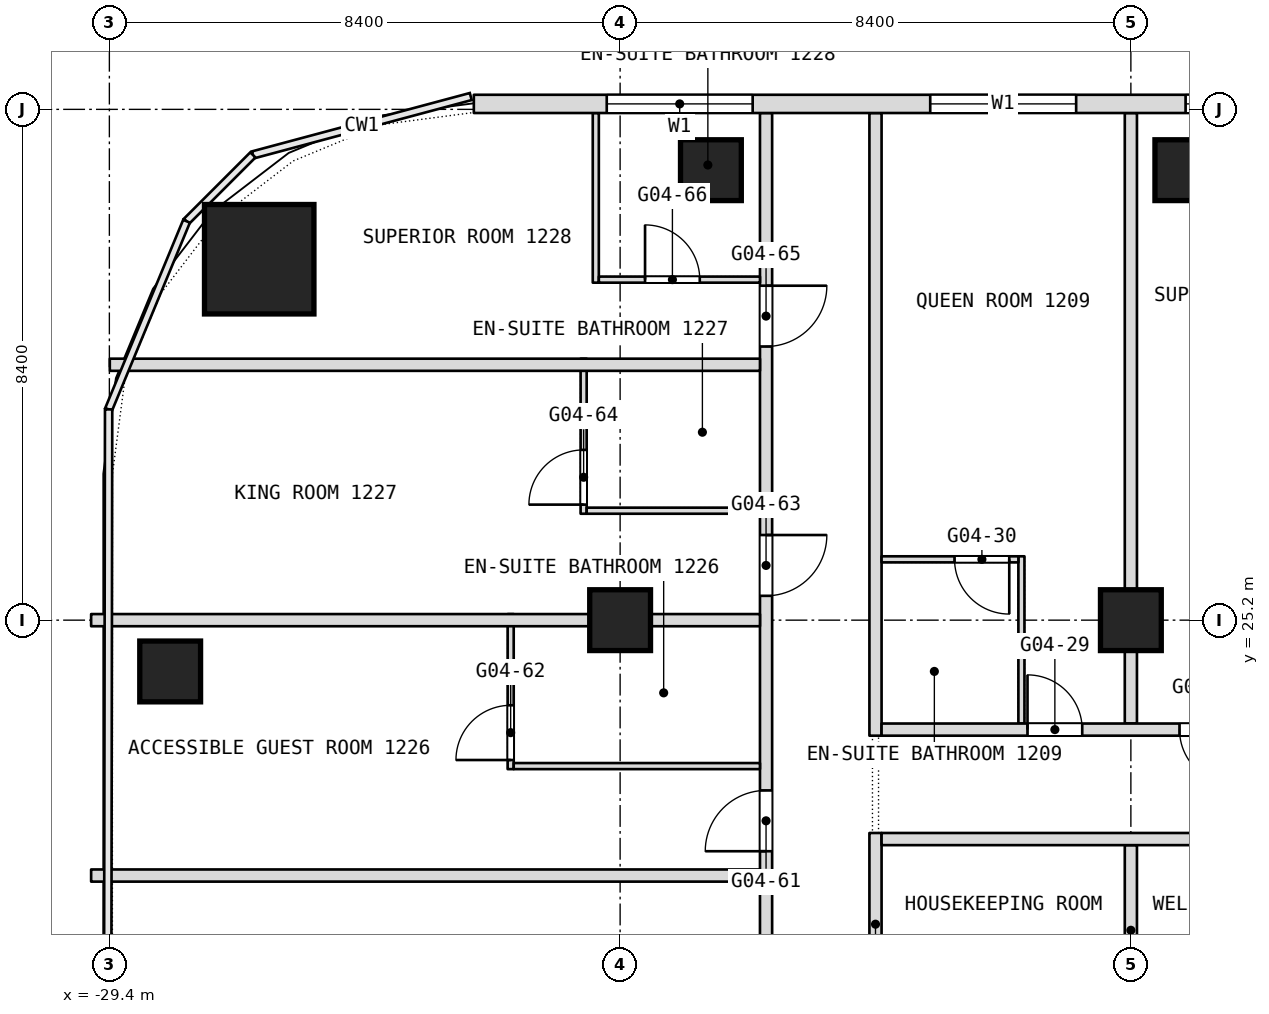
"""IFC4 building model, lengths in metres.
Left out: names, types, materials, properties, quantities, classifications, styles, units other than length and angle.
Written with IfcOpenShell. Run it as: python <this file> out.ifc"""

import sys

from ifc_helpers import new_model, si_unit, direction, frame, frame_2d, origin, origin_2d, place, context, subcontext, project, spatial, rectangle, extrude, element, fill, save


model = new_model("IFC4")
c1 = context("Model", 3, precision=1e-05, world=origin(), true_north=direction((0.0, 1.0)))
c2 = subcontext(c1, "Body", "Model", "MODEL_VIEW")
j1 = project(units=[si_unit("LENGTHUNIT", "METRE"), si_unit("PLANEANGLEUNIT", "RADIAN")], contexts=[c1])
p1 = place(None, origin())
s1 = spatial("IfcSite", under=j1, at=p1, CompositionType="ELEMENT")
p2 = place(p1, origin())
s2 = spatial("IfcBuilding", under=s1, at=p2, CompositionType="ELEMENT")
p3 = place(p2, frame((0.0, 0.0, 58.1)))
s3 = spatial("IfcBuildingStorey", under=s2, at=p3, CompositionType="ELEMENT", Elevation=58.1)
p4 = place(p3, frame((-26.936, 31.135, 0.0), z_axis=(0.0, 0.0, 1.0), x_axis=(1.0, 0.0, 0.0)))
e1 = element("IfcColumn", 1, at=p4, inside=s3, PredefinedType="COLUMN", context=c2, shape_type="SweptSolid", body=[
    extrude(rectangle(XDim=1.8, YDim=1.8, at=origin_2d()), origin(), (0.0, 0.0, 1.0), 3.6),
])
for number, where, z_axis, x_axis in (
    (2, (-21.0, 25.2, 0.0), (0.0, 0.0, 1.0), (1.0, 0.0, 0.0)),
    (3, (-12.6, 25.2, 0.0), (0.0, 0.0, 1.0), (1.0, 0.0, 0.0)),
    (4, (-28.4, 24.356, 0.0), (0.0, 0.0, 1.0), (1.0, 0.0, 0.0)),
    (5, (-19.507, 32.6, 0.0), (0.0, 0.0, 1.0), (1.0, 0.0, 0.0)),
    (6, (-11.704, 32.6, 0.0), (0.0, 0.0, 1.0), (1.0, 0.0, 0.0)),
):
    element("IfcColumn", number, at=place(p3, frame(where, z_axis=z_axis, x_axis=x_axis)), inside=s3, PredefinedType="COLUMN", context=c2, shape_type="SweptSolid", body=[
        extrude(rectangle(XDim=1.0, YDim=1.0, at=origin_2d()), origin(), (0.0, 0.0, 1.0), 3.6),
    ])
p5 = place(p3, frame((-12.6, 18.7, 0.0), z_axis=(0.0, 0.0, 1.0), x_axis=(0.0, 1.0, 0.0)))
e7 = element("IfcWall", 7, at=p5, inside=s3, PredefinedType="PARTITIONING", context=c2, shape_type="SweptSolid", body=[
    extrude(rectangle(XDim=2.8, YDim=0.2, at=frame_2d((1.4, 0.0))), origin(), (0.0, 0.0, 1.0), 3.34),
])
p6 = place(p3, frame((-12.6, 23.5, 0.0), z_axis=(0.0, 0.0, 1.0), x_axis=(0.0, 1.0, 0.0)))
e8 = element("IfcWall", 8, at=p6, inside=s3, PredefinedType="PARTITIONING", context=c2, shape_type="SweptSolid", body=[
    extrude(rectangle(XDim=10.04, YDim=0.2, at=frame_2d((5.02, 0.0))), origin(), (0.0, 0.0, 1.0), 3.34),
])
p7 = place(p3, frame((-14.4, 23.5, 0.0), z_axis=(0.0, 0.0, 1.0), x_axis=(0.0, 1.0, 0.0)))
e9 = element("IfcWall", 9, at=p7, inside=s3, PredefinedType="PARTITIONING", context=c2, shape_type="SweptSolid", body=[
    extrude(rectangle(XDim=2.75, YDim=0.1, at=frame_2d((1.375, 0.0))), origin(), (0.0, 0.0, 1.0), 3.34),
])
p8 = place(p3, frame((-16.8, 18.7, 0.0), z_axis=(0.0, 0.0, 1.0), x_axis=(0.0, 1.0, 0.0)))
e10 = element("IfcWall", 10, at=p8, inside=s3, PredefinedType="PARTITIONING", context=c2, shape_type="SweptSolid", body=[
    extrude(rectangle(XDim=3.0, YDim=0.2, at=frame_2d((1.5, 0.0))), origin(), (0.0, 0.0, 1.0), 3.34),
])
p9 = place(p3, frame((-16.8, 23.3, 0.0), z_axis=(0.0, 0.0, 1.0), x_axis=(0.0, 1.0, 0.0)))
e11 = element("IfcWall", 11, at=p9, inside=s3, PredefinedType="PARTITIONING", context=c2, shape_type="SweptSolid", body=[
    extrude(rectangle(XDim=10.24, YDim=0.2, at=frame_2d((5.12, 0.0))), origin(), (0.0, 0.0, 1.0), 3.34),
])
p10 = place(p3, frame((-18.6, 18.5, 0.0), z_axis=(0.0, 0.0, 1.0), x_axis=(0.0, 1.0, 0.0)))
e12 = element("IfcWall", 12, at=p10, inside=s3, PredefinedType="PARTITIONING", context=c2, shape_type="SweptSolid", body=[
    extrude(rectangle(XDim=15.04, YDim=0.2, at=frame_2d((7.52, 0.0))), origin(), (0.0, 0.0, 1.0), 3.34),
])
p11 = place(p10, frame((2.9, 0.0, 0.0)))
e13 = element("IfcOpeningElement", 13, at=p11, cuts=e12, PredefinedType="OPENING", context=c2, shape_type="SweptSolid", body=[
    extrude(rectangle(XDim=1.0, YDim=2.1, at=frame_2d((0.5, 1.05))), frame((0.0, 0.1, 0.0), z_axis=(0.0, -1.0, 0.0), x_axis=(1.0, 0.0, 0.0)), (0.0, 0.0, 1.0), 0.2),
])
p12 = place(p10, frame((7.1, 0.0, 0.0)))
e14 = element("IfcOpeningElement", 14, at=p12, cuts=e12, PredefinedType="OPENING", context=c2, shape_type="SweptSolid", body=[
    extrude(rectangle(XDim=1.0, YDim=2.1, at=frame_2d((0.5, 1.05))), frame((0.0, 0.1, 0.0), z_axis=(0.0, -1.0, 0.0), x_axis=(1.0, 0.0, 0.0)), (0.0, 0.0, 1.0), 0.2),
])
p13 = place(p10, frame((11.2, 0.0, 0.0)))
e15 = element("IfcOpeningElement", 15, at=p13, cuts=e12, PredefinedType="OPENING", context=c2, shape_type="SweptSolid", body=[
    extrude(rectangle(XDim=1.0, YDim=2.1, at=frame_2d((0.5, 1.05))), frame((0.0, 0.1, 0.0), z_axis=(0.0, -1.0, 0.0), x_axis=(1.0, 0.0, 0.0)), (0.0, 0.0, 1.0), 0.2),
])
p14 = place(p3, frame((-29.7, 21.0, 0.0), z_axis=(0.0, 0.0, 1.0), x_axis=(1.0, 0.0, 0.0)))
e16 = element("IfcWall", 16, at=p14, inside=s3, PredefinedType="PARTITIONING", context=c2, shape_type="SweptSolid", body=[
    extrude(rectangle(XDim=11.0, YDim=0.2, at=frame_2d((5.5, 0.0))), origin(), (0.0, 0.0, 1.0), 3.34),
])
p15 = place(p3, frame((-21.4, 30.75, 0.0), z_axis=(0.0, 0.0, 1.0), x_axis=(0.0, 1.0, 0.0)))
e17 = element("IfcWall", 17, at=p15, inside=s3, PredefinedType="PARTITIONING", context=c2, shape_type="SweptSolid", body=[
    extrude(rectangle(XDim=2.79, YDim=0.1, at=frame_2d((1.395, 0.0))), origin(), (0.0, 0.0, 1.0), 3.34),
])
p16 = place(p3, frame((-21.6, 26.95, 0.0), z_axis=(0.0, 0.0, 1.0), x_axis=(0.0, 1.0, 0.0)))
e18 = element("IfcWall", 18, at=p16, inside=s3, PredefinedType="PARTITIONING", context=c2, shape_type="SweptSolid", body=[
    extrude(rectangle(XDim=2.55, YDim=0.1, at=frame_2d((1.275, 0.0))), origin(), (0.0, 0.0, 1.0), 3.34),
])
p17 = place(p16, frame((0.15, 0.0, 0.0)))
e19 = element("IfcOpeningElement", 19, at=p17, cuts=e18, PredefinedType="OPENING", context=c2, shape_type="SweptSolid", body=[
    extrude(rectangle(XDim=0.9, YDim=2.1, at=frame_2d((0.45, 1.05))), frame((0.0, 0.05, 0.0), z_axis=(0.0, -1.0, 0.0), x_axis=(1.0, 0.0, 0.0)), (0.0, 0.0, 1.0), 0.1),
])
p18 = place(p3, frame((-16.7, 21.6, 0.0), z_axis=(0.0, 0.0, 1.0), x_axis=(1.0, 0.0, 0.0)))
e20 = element("IfcWall", 20, at=p18, inside=s3, PredefinedType="PARTITIONING", context=c2, shape_type="SweptSolid", body=[
    extrude(rectangle(XDim=24.9, YDim=0.2, at=frame_2d((12.45, 0.0))), origin(), (0.0, 0.0, 1.0), 3.34),
])
p19 = place(p3, frame((-22.8, 22.75, 0.0), z_axis=(0.0, 0.0, 1.0), x_axis=(0.0, 1.0, 0.0)))
e21 = element("IfcWall", 21, at=p19, inside=s3, PredefinedType="PARTITIONING", context=c2, shape_type="SweptSolid", body=[
    extrude(rectangle(XDim=2.55, YDim=0.1, at=frame_2d((1.275, 0.0))), origin(), (0.0, 0.0, 1.0), 3.34),
])
p20 = place(p19, frame((0.15, 0.0, 0.0)))
e22 = element("IfcOpeningElement", 22, at=p20, cuts=e21, PredefinedType="OPENING", context=c2, shape_type="SweptSolid", body=[
    extrude(rectangle(XDim=0.9, YDim=2.1, at=frame_2d((0.45, 1.05))), frame((0.0, 0.05, 0.0), z_axis=(0.0, -1.0, 0.0), x_axis=(1.0, 0.0, 0.0)), (0.0, 0.0, 1.0), 0.1),
])
p21 = place(p3, frame((-22.75, 22.8, 0.0), z_axis=(0.0, 0.0, 1.0), x_axis=(1.0, 0.0, 0.0)))
e23 = element("IfcWall", 23, at=p21, inside=s3, PredefinedType="PARTITIONING", context=c2, shape_type="SweptSolid", body=[
    extrude(rectangle(XDim=4.05, YDim=0.1, at=frame_2d((2.025, 0.0))), origin(), (0.0, 0.0, 1.0), 3.34),
])
p22 = place(p3, frame((-16.7, 23.4, 0.0), z_axis=(0.0, 0.0, 1.0), x_axis=(1.0, 0.0, 0.0)))
e24 = element("IfcWall", 24, at=p22, inside=s3, PredefinedType="PARTITIONING", context=c2, shape_type="SweptSolid", body=[
    extrude(rectangle(XDim=23.4, YDim=0.2, at=frame_2d((11.7, 0.0))), origin(), (0.0, 0.0, 1.0), 3.34),
])
p23 = place(p22, frame((2.4, 0.0, 0.0)))
e25 = element("IfcOpeningElement", 25, at=p23, cuts=e24, PredefinedType="OPENING", context=c2, shape_type="SweptSolid", body=[
    extrude(rectangle(XDim=0.9, YDim=2.1, at=frame_2d((0.45, 1.05))), frame((0.0, 0.1, 0.0), z_axis=(0.0, -1.0, 0.0), x_axis=(1.0, 0.0, 0.0)), (0.0, 0.0, 1.0), 0.2),
])
p24 = place(p22, frame((4.9, 0.0, 0.0)))
e26 = element("IfcOpeningElement", 26, at=p24, cuts=e24, PredefinedType="OPENING", context=c2, shape_type="SweptSolid", body=[
    extrude(rectangle(XDim=0.9, YDim=2.1, at=frame_2d((0.45, 1.05))), frame((0.0, 0.1, 0.0), z_axis=(0.0, -1.0, 0.0), x_axis=(1.0, 0.0, 0.0)), (0.0, 0.0, 1.0), 0.2),
])
p25 = place(p22, frame((10.8, 0.0, 0.0)))
e27 = element("IfcOpeningElement", 27, at=p25, cuts=e24, PredefinedType="OPENING", context=c2, shape_type="SweptSolid", body=[
    extrude(rectangle(XDim=0.9, YDim=2.1, at=frame_2d((0.45, 1.05))), frame((0.0, 0.1, 0.0), z_axis=(0.0, -1.0, 0.0), x_axis=(1.0, 0.0, 0.0)), (0.0, 0.0, 1.0), 0.2),
])
p26 = place(p22, frame((16.2, 0.0, 0.0)))
e28 = element("IfcOpeningElement", 28, at=p26, cuts=e24, PredefinedType="OPENING", context=c2, shape_type="SweptSolid", body=[
    extrude(rectangle(XDim=1.1, YDim=2.1, at=frame_2d((0.55, 1.05))), frame((0.0, 0.1, 0.0), z_axis=(0.0, -1.0, 0.0), x_axis=(1.0, 0.0, 0.0)), (0.0, 0.0, 1.0), 0.2),
])
p27 = place(p22, frame((21.7, 0.0, 0.0)))
e29 = element("IfcOpeningElement", 29, at=p27, cuts=e24, PredefinedType="OPENING", context=c2, shape_type="SweptSolid", body=[
    extrude(rectangle(XDim=0.9, YDim=2.1, at=frame_2d((0.45, 1.05))), frame((0.0, 0.1, 0.0), z_axis=(0.0, -1.0, 0.0), x_axis=(1.0, 0.0, 0.0)), (0.0, 0.0, 1.0), 0.2),
])
p28 = place(p3, frame((-29.7, 25.2, 0.0), z_axis=(0.0, 0.0, 1.0), x_axis=(1.0, 0.0, 0.0)))
e30 = element("IfcWall", 30, at=p28, inside=s3, PredefinedType="PARTITIONING", context=c2, shape_type="SweptSolid", body=[
    extrude(rectangle(XDim=11.0, YDim=0.2, at=frame_2d((5.5, 0.0))), origin(), (0.0, 0.0, 1.0), 2.84),
])
p29 = place(p3, frame((-16.7, 26.2, 0.0), z_axis=(0.0, 0.0, 1.0), x_axis=(1.0, 0.0, 0.0)))
e31 = element("IfcWall", 31, at=p29, inside=s3, PredefinedType="PARTITIONING", context=c2, shape_type="SweptSolid", body=[
    extrude(rectangle(XDim=2.25, YDim=0.1, at=frame_2d((1.125, 0.0))), origin(), (0.0, 0.0, 1.0), 3.34),
])
p30 = place(p29, frame((1.2, 0.0, 0.0)))
e32 = element("IfcOpeningElement", 32, at=p30, cuts=e31, PredefinedType="OPENING", context=c2, shape_type="SweptSolid", body=[
    extrude(rectangle(XDim=0.9, YDim=2.1, at=frame_2d((0.45, 1.05))), frame((0.0, 0.05, 0.0), z_axis=(0.0, -1.0, 0.0), x_axis=(1.0, 0.0, 0.0)), (0.0, 0.0, 1.0), 0.1),
])
p31 = place(p3, frame((-21.55, 27.0, 0.0), z_axis=(0.0, 0.0, 1.0), x_axis=(1.0, 0.0, 0.0)))
e33 = element("IfcWall", 33, at=p31, inside=s3, PredefinedType="PARTITIONING", context=c2, shape_type="SweptSolid", body=[
    extrude(rectangle(XDim=2.85, YDim=0.1, at=frame_2d((1.425, 0.0))), origin(), (0.0, 0.0, 1.0), 3.34),
])
p32 = place(p3, frame((-29.393, 29.4, 0.0), z_axis=(0.0, 0.0, 1.0), x_axis=(1.0, 0.0, 0.0)))
e34 = element("IfcWall", 34, at=p32, inside=s3, PredefinedType="PARTITIONING", context=c2, shape_type="SweptSolid", body=[
    extrude(rectangle(XDim=10.693, YDim=0.2, at=frame_2d((5.347, 0.0))), origin(), (0.0, 0.0, 1.0), 3.34),
])
p33 = place(p3, frame((-21.35, 30.8, 0.0), z_axis=(0.0, 0.0, 1.0), x_axis=(1.0, 0.0, 0.0)))
e35 = element("IfcWall", 35, at=p33, inside=s3, PredefinedType="PARTITIONING", context=c2, shape_type="SweptSolid", body=[
    extrude(rectangle(XDim=2.65, YDim=0.1, at=frame_2d((1.325, 0.0))), origin(), (0.0, 0.0, 1.0), 3.34),
])
p34 = place(p33, frame((0.76, 0.0, 0.0)))
e36 = element("IfcOpeningElement", 36, at=p34, cuts=e35, PredefinedType="OPENING", context=c2, shape_type="SweptSolid", body=[
    extrude(rectangle(XDim=0.9, YDim=2.1, at=frame_2d((0.45, 1.05))), frame((0.0, 0.05, 0.0), z_axis=(0.0, -1.0, 0.0), x_axis=(1.0, 0.0, 0.0)), (0.0, 0.0, 1.0), 0.1),
])
p35 = place(p3, frame((23.406, 33.69, 0.0), z_axis=(0.0, 0.0, 1.0), x_axis=(-1.0, 0.0, 0.0)))
e37 = element("IfcWall", 37, at=p35, inside=s3, PredefinedType="NOTDEFINED", context=c2, shape_type="SweptSolid", body=[
    extrude(rectangle(XDim=46.812, YDim=0.3, at=frame_2d((23.406, 0.0))), origin(), (0.0, 0.0, 1.0), 3.6),
])
p36 = place(p35, frame((2.186, 0.0, 0.9)))
e38 = element("IfcOpeningElement", 38, at=p36, cuts=e37, PredefinedType="OPENING", context=c2, shape_type="SweptSolid", body=[
    extrude(rectangle(XDim=2.4, YDim=2.1, at=frame_2d((1.2, 1.05))), frame((0.0, 0.15, 0.0), z_axis=(0.0, -1.0, 0.0), x_axis=(1.0, 0.0, 0.0)), (0.0, 0.0, 1.0), 0.3),
])
p37 = place(p35, frame((7.506, 0.0, 0.9)))
e39 = element("IfcOpeningElement", 39, at=p37, cuts=e37, PredefinedType="OPENING", context=c2, shape_type="SweptSolid", body=[
    extrude(rectangle(XDim=2.4, YDim=2.1, at=frame_2d((1.2, 1.05))), frame((0.0, 0.15, 0.0), z_axis=(0.0, -1.0, 0.0), x_axis=(1.0, 0.0, 0.0)), (0.0, 0.0, 1.0), 0.3),
])
p38 = place(p35, frame((11.706, 0.0, 0.9)))
e40 = element("IfcOpeningElement", 40, at=p38, cuts=e37, PredefinedType="OPENING", context=c2, shape_type="SweptSolid", body=[
    extrude(rectangle(XDim=2.4, YDim=2.1, at=frame_2d((1.2, 1.05))), frame((0.0, 0.15, 0.0), z_axis=(0.0, -1.0, 0.0), x_axis=(1.0, 0.0, 0.0)), (0.0, 0.0, 1.0), 0.3),
])
p39 = place(p35, frame((15.906, 0.0, 0.9)))
e41 = element("IfcOpeningElement", 41, at=p39, cuts=e37, PredefinedType="OPENING", context=c2, shape_type="SweptSolid", body=[
    extrude(rectangle(XDim=2.4, YDim=2.1, at=frame_2d((1.2, 1.05))), frame((0.0, 0.15, 0.0), z_axis=(0.0, -1.0, 0.0), x_axis=(1.0, 0.0, 0.0)), (0.0, 0.0, 1.0), 0.3),
])
p40 = place(p35, frame((20.106, 0.0, 0.9)))
e42 = element("IfcOpeningElement", 42, at=p40, cuts=e37, PredefinedType="OPENING", context=c2, shape_type="SweptSolid", body=[
    extrude(rectangle(XDim=2.4, YDim=2.1, at=frame_2d((1.2, 1.05))), frame((0.0, 0.15, 0.0), z_axis=(0.0, -1.0, 0.0), x_axis=(1.0, 0.0, 0.0)), (0.0, 0.0, 1.0), 0.3),
])
p41 = place(p35, frame((24.306, 0.0, 0.9)))
e43 = element("IfcOpeningElement", 43, at=p41, cuts=e37, PredefinedType="OPENING", context=c2, shape_type="SweptSolid", body=[
    extrude(rectangle(XDim=2.4, YDim=2.1, at=frame_2d((1.2, 1.05))), frame((0.0, 0.15, 0.0), z_axis=(0.0, -1.0, 0.0), x_axis=(1.0, 0.0, 0.0)), (0.0, 0.0, 1.0), 0.3),
])
p42 = place(p35, frame((28.506, 0.0, 0.9)))
e44 = element("IfcOpeningElement", 44, at=p42, cuts=e37, PredefinedType="OPENING", context=c2, shape_type="SweptSolid", body=[
    extrude(rectangle(XDim=2.4, YDim=2.1, at=frame_2d((1.2, 1.05))), frame((0.0, 0.15, 0.0), z_axis=(0.0, -1.0, 0.0), x_axis=(1.0, 0.0, 0.0)), (0.0, 0.0, 1.0), 0.3),
])
p43 = place(p35, frame((32.706, 0.0, 0.9)))
e45 = element("IfcOpeningElement", 45, at=p43, cuts=e37, PredefinedType="OPENING", context=c2, shape_type="SweptSolid", body=[
    extrude(rectangle(XDim=2.4, YDim=2.1, at=frame_2d((1.2, 1.05))), frame((0.0, 0.15, 0.0), z_axis=(0.0, -1.0, 0.0), x_axis=(1.0, 0.0, 0.0)), (0.0, 0.0, 1.0), 0.3),
])
p44 = place(p35, frame((36.906, 0.0, 0.9)))
e46 = element("IfcOpeningElement", 46, at=p44, cuts=e37, PredefinedType="OPENING", context=c2, shape_type="SweptSolid", body=[
    extrude(rectangle(XDim=2.4, YDim=2.1, at=frame_2d((1.2, 1.05))), frame((0.0, 0.15, 0.0), z_axis=(0.0, -1.0, 0.0), x_axis=(1.0, 0.0, 0.0)), (0.0, 0.0, 1.0), 0.3),
])
p45 = place(p35, frame((42.226, 0.0, 0.9)))
e47 = element("IfcOpeningElement", 47, at=p45, cuts=e37, PredefinedType="OPENING", context=c2, shape_type="SweptSolid", body=[
    extrude(rectangle(XDim=2.4, YDim=2.1, at=frame_2d((1.2, 1.05))), frame((0.0, 0.15, 0.0), z_axis=(0.0, -1.0, 0.0), x_axis=(1.0, 0.0, 0.0)), (0.0, 0.0, 1.0), 0.3),
])
p46 = place(p11, origin())
e48 = element("IfcDoor", 48, at=p46, inside=s3, OperationType="SINGLE_SWING_RIGHT", PredefinedType="DOOR", context=c2, shape_type="SweptSolid", body=[
    extrude(rectangle(XDim=1.0, YDim=2.1, at=frame_2d((0.5, 1.05))), frame((0.0, 0.025, 0.0), z_axis=(0.0, -1.0, 0.0), x_axis=(1.0, 0.0, 0.0)), (0.0, 0.0, 1.0), 0.05),
])
fill(e13, e48)
p47 = place(p12, origin())
e49 = element("IfcDoor", 49, at=p47, inside=s3, OperationType="SINGLE_SWING_RIGHT", PredefinedType="DOOR", context=c2, shape_type="SweptSolid", body=[
    extrude(rectangle(XDim=1.0, YDim=2.1, at=frame_2d((0.5, 1.05))), frame((0.0, 0.025, 0.0), z_axis=(0.0, -1.0, 0.0), x_axis=(1.0, 0.0, 0.0)), (0.0, 0.0, 1.0), 0.05),
])
fill(e14, e49)
p48 = place(p13, origin())
e50 = element("IfcDoor", 50, at=p48, inside=s3, OperationType="SINGLE_SWING_RIGHT", PredefinedType="DOOR", context=c2, shape_type="SweptSolid", body=[
    extrude(rectangle(XDim=1.0, YDim=2.1, at=frame_2d((0.5, 1.05))), frame((0.0, 0.025, 0.0), z_axis=(0.0, -1.0, 0.0), x_axis=(1.0, 0.0, 0.0)), (0.0, 0.0, 1.0), 0.05),
])
fill(e15, e50)
p49 = place(p17, origin())
e51 = element("IfcDoor", 51, at=p49, inside=s3, OperationType="SINGLE_SWING_RIGHT", PredefinedType="DOOR", context=c2, shape_type="SweptSolid", body=[
    extrude(rectangle(XDim=0.9, YDim=2.1, at=frame_2d((0.45, 1.05))), frame((0.0, 0.025, 0.0), z_axis=(0.0, -1.0, 0.0), x_axis=(1.0, 0.0, 0.0)), (0.0, 0.0, 1.0), 0.05),
])
fill(e19, e51)
p50 = place(p20, origin())
e52 = element("IfcDoor", 52, at=p50, inside=s3, OperationType="SINGLE_SWING_RIGHT", PredefinedType="DOOR", context=c2, shape_type="SweptSolid", body=[
    extrude(rectangle(XDim=0.9, YDim=2.1, at=frame_2d((0.45, 1.05))), frame((0.0, 0.025, 0.0), z_axis=(0.0, -1.0, 0.0), x_axis=(1.0, 0.0, 0.0)), (0.0, 0.0, 1.0), 0.05),
])
fill(e22, e52)
p51 = place(p23, origin())
e53 = element("IfcDoor", 53, at=p51, inside=s3, OperationType="SINGLE_SWING_LEFT", PredefinedType="DOOR", context=c2, shape_type="SweptSolid", body=[
    extrude(rectangle(XDim=0.9, YDim=2.1, at=frame_2d((0.45, 1.05))), frame((0.0, 0.025, 0.0), z_axis=(0.0, -1.0, 0.0), x_axis=(1.0, 0.0, 0.0)), (0.0, 0.0, 1.0), 0.05),
])
fill(e25, e53)
p52 = place(p24, origin())
e54 = element("IfcDoor", 54, at=p52, inside=s3, OperationType="SINGLE_SWING_RIGHT", PredefinedType="DOOR", context=c2, shape_type="SweptSolid", body=[
    extrude(rectangle(XDim=0.9, YDim=2.1, at=frame_2d((0.45, 1.05))), frame((0.0, 0.025, 0.0), z_axis=(0.0, -1.0, 0.0), x_axis=(1.0, 0.0, 0.0)), (0.0, 0.0, 1.0), 0.05),
])
fill(e26, e54)
p53 = place(p30, origin())
e55 = element("IfcDoor", 55, at=p53, inside=s3, OperationType="SINGLE_SWING_LEFT", PredefinedType="DOOR", context=c2, shape_type="SweptSolid", body=[
    extrude(rectangle(XDim=0.9, YDim=2.1, at=frame_2d((0.45, 1.05))), frame((0.0, 0.025, 0.0), z_axis=(0.0, -1.0, 0.0), x_axis=(1.0, 0.0, 0.0)), (0.0, 0.0, 1.0), 0.05),
])
fill(e32, e55)
p54 = place(p34, origin())
e56 = element("IfcDoor", 56, at=p54, inside=s3, OperationType="SINGLE_SWING_LEFT", PredefinedType="DOOR", context=c2, shape_type="SweptSolid", body=[
    extrude(rectangle(XDim=0.9, YDim=2.1, at=frame_2d((0.45, 1.05))), frame((0.0, 0.025, 0.0), z_axis=(0.0, -1.0, 0.0), x_axis=(1.0, 0.0, 0.0)), (0.0, 0.0, 1.0), 0.05),
])
fill(e36, e56)
p55 = place(p43, origin())
e57 = element("IfcWindow", 57, at=p55, inside=s3, PartitioningType="SINGLE_PANEL", PredefinedType="WINDOW", context=c2, shape_type="SweptSolid", body=[
    extrude(rectangle(XDim=2.4, YDim=2.1, at=frame_2d((1.2, 1.05))), frame((0.0, 0.03, 0.0), z_axis=(0.0, -1.0, 0.0), x_axis=(1.0, 0.0, 0.0)), (0.0, 0.0, 1.0), 0.06),
])
fill(e45, e57)
p56 = place(p44, origin())
e58 = element("IfcWindow", 58, at=p56, inside=s3, PartitioningType="SINGLE_PANEL", PredefinedType="WINDOW", context=c2, shape_type="SweptSolid", body=[
    extrude(rectangle(XDim=2.4, YDim=2.1, at=frame_2d((1.2, 1.05))), frame((0.0, 0.03, 0.0), z_axis=(0.0, -1.0, 0.0), x_axis=(1.0, 0.0, 0.0)), (0.0, 0.0, 1.0), 0.06),
])
fill(e46, e58)
p57 = place(p45, origin())
e59 = element("IfcWindow", 59, at=p57, inside=s3, PartitioningType="SINGLE_PANEL", PredefinedType="WINDOW", context=c2, shape_type="SweptSolid", body=[
    extrude(rectangle(XDim=2.4, YDim=2.1, at=frame_2d((1.2, 1.05))), frame((0.0, 0.03, 0.0), z_axis=(0.0, -1.0, 0.0), x_axis=(1.0, 0.0, 0.0)), (0.0, 0.0, 1.0), 0.06),
])
fill(e47, e59)
save(model, sys.argv[1])
